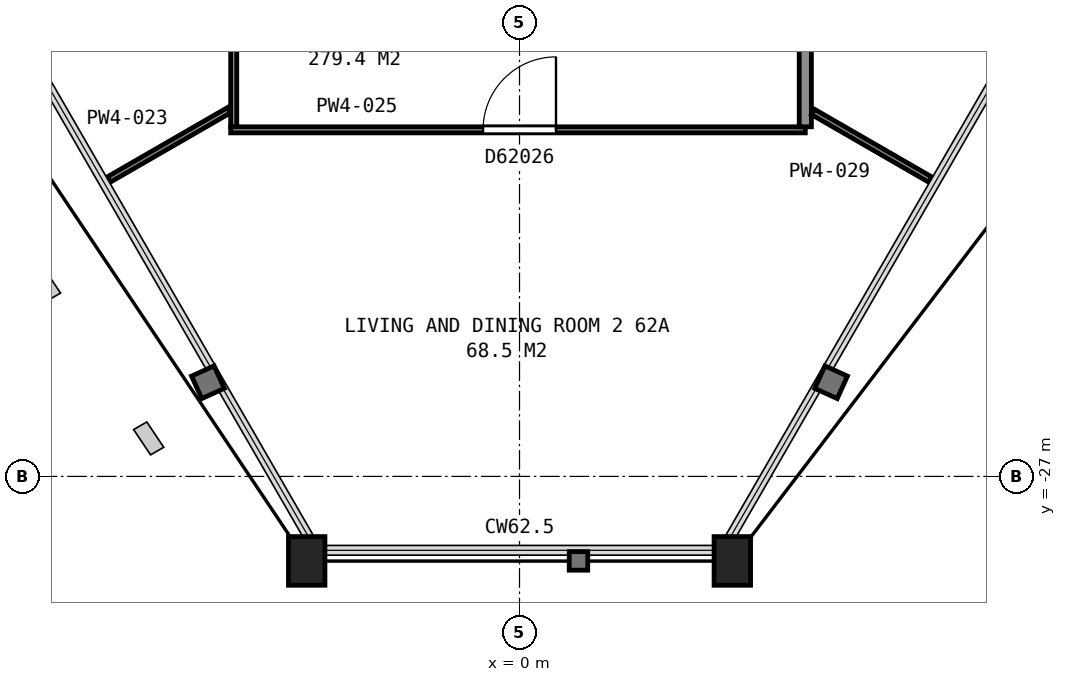
"""IFC4 building model, lengths in metres.
Left out: names, types, materials, properties, quantities, classifications, styles, units other than length and angle.
Written with IfcOpenShell. Run it as: python <this file> out.ifc"""

import sys

from ifc_helpers import new_model, si_unit, direction, frame, frame_2d, origin, origin_2d, place, context, subcontext, project, spatial, rectangle, hollow_rectangle, extrude, element, fill, save


model = new_model("IFC4")
c1 = context("Model", 3, precision=1e-05, world=origin(), true_north=direction((0.0, 1.0)))
c2 = subcontext(c1, "Body", "Model", "MODEL_VIEW")
j1 = project(units=[si_unit("LENGTHUNIT", "METRE"), si_unit("PLANEANGLEUNIT", "RADIAN")], contexts=[c1])
p1 = place(None, origin())
s1 = spatial("IfcSite", under=j1, at=p1, CompositionType="ELEMENT")
p2 = place(p1, origin())
s2 = spatial("IfcBuilding", under=s1, at=p2, CompositionType="ELEMENT")
p3 = place(p2, frame((0.0, 0.0, 247.1)))
s3 = spatial("IfcBuildingStorey", under=s2, at=p3, CompositionType="ELEMENT", Elevation=247.1)
for number, where, z_axis, x_axis in (
    (1, (-3.5, -28.39, 0.065), (0.0, 0.0, 1.0), (-1.0, 0.0, 0.0)),
    (2, (3.5, -28.39, 0.065), (0.0, 0.0, 1.0), (-1.0, 0.0, 0.0)),
):
    element("IfcColumn", number, at=place(p3, frame(where, z_axis=z_axis, x_axis=x_axis)), inside=s3, PredefinedType="COLUMN", context=c2, shape_type="SweptSolid", body=[
        extrude(hollow_rectangle(XDim=0.6, YDim=0.8, WallThickness=0.05, at=origin_2d()), origin(), (0.0, 0.0, 1.0), 3.635),
    ])
p4 = place(p3, frame((-6.752, -22.116, 0.0), z_axis=(0.0, 0.0, 1.0), x_axis=(0.866135723987, 0.499808871103, 0.0)))
e3 = element("IfcWall", 3, at=p4, inside=s3, PredefinedType="PARTITIONING", context=c2, shape_type="SweptSolid", body=[
    extrude(rectangle(XDim=2.283, YDim=0.1, at=frame_2d((1.141, 0.0))), origin(), (0.0, 0.0, 1.0), 2.713),
])
p5 = place(p3, frame((-4.7, -21.25, 0.0), z_axis=(0.0, 0.0, 1.0), x_axis=(0.0, 1.0, 0.0)))
e4 = element("IfcWall", 4, at=p5, inside=s3, PredefinedType="PARTITIONING", context=c2, shape_type="SweptSolid", body=[
    extrude(rectangle(XDim=8.502, YDim=0.1, at=frame_2d((4.251, 0.0))), origin(), (0.0, 0.0, 1.0), 2.713),
])
p6 = place(p5, frame((6.921, 0.0, 0.0)))
e5 = element("IfcOpeningElement", 5, at=p6, cuts=e4, PredefinedType="OPENING", context=c2, shape_type="SweptSolid", body=[
    extrude(rectangle(XDim=0.9, YDim=2.1, at=frame_2d((0.45, 1.05))), frame((0.0, 0.06, 0.0), z_axis=(0.0, -1.0, 0.0), x_axis=(1.0, 0.0, 0.0)), (0.0, 0.0, 1.0), 0.12),
])
p7 = place(p5, frame((2.818, 0.0, 0.0)))
e6 = element("IfcOpeningElement", 6, at=p7, cuts=e4, PredefinedType="OPENING", context=c2, shape_type="SweptSolid", body=[
    extrude(rectangle(XDim=0.9, YDim=2.1, at=frame_2d((0.45, 1.05))), frame((0.0, 0.06, 0.0), z_axis=(0.0, -1.0, 0.0), x_axis=(1.0, 0.0, 0.0)), (0.0, 0.0, 1.0), 0.12),
])
p8 = place(p3, frame((4.7, -21.3, 0.0), z_axis=(0.0, 0.0, 1.0), x_axis=(-1.0, 0.0, 0.0)))
e7 = element("IfcWall", 7, at=p8, inside=s3, PredefinedType="PARTITIONING", context=c2, shape_type="SweptSolid", body=[
    extrude(rectangle(XDim=9.45, YDim=0.1, at=frame_2d((4.725, 0.0))), origin(), (0.0, 0.0, 1.0), 2.713),
])
p9 = place(p8, frame((4.1, 0.0, 0.0)))
e8 = element("IfcOpeningElement", 8, at=p9, cuts=e7, PredefinedType="OPENING", context=c2, shape_type="SweptSolid", body=[
    extrude(rectangle(XDim=1.2, YDim=2.1, at=frame_2d((0.6, 1.05))), frame((0.0, 0.06, 0.0), z_axis=(0.0, -1.0, 0.0), x_axis=(1.0, 0.0, 0.0)), (0.0, 0.0, 1.0), 0.12),
])
p10 = place(p3, frame((4.7, -12.798, 0.0), z_axis=(0.0, 0.0, 1.0), x_axis=(0.0, -1.0, 0.0)))
e9 = element("IfcWall", 9, at=p10, inside=s3, PredefinedType="PARTITIONING", context=c2, shape_type="SweptSolid", body=[
    extrude(rectangle(XDim=8.452, YDim=0.2, at=frame_2d((4.226, 0.0))), origin(), (0.0, 0.0, 1.0), 2.713),
])
p11 = place(p10, frame((5.084, 0.0, 0.0)))
e10 = element("IfcOpeningElement", 10, at=p11, cuts=e9, PredefinedType="OPENING", context=c2, shape_type="SweptSolid", body=[
    extrude(rectangle(XDim=0.9, YDim=2.1, at=frame_2d((0.45, 1.05))), frame((0.0, 0.11, 0.0), z_axis=(0.0, -1.0, 0.0), x_axis=(1.0, 0.0, 0.0)), (0.0, 0.0, 1.0), 0.22),
])
p12 = place(p3, frame((4.825, -21.004, 0.0), z_axis=(0.0, 0.0, 1.0), x_axis=(0.866121639155, -0.499833278392, 0.0)))
e11 = element("IfcWall", 11, at=p12, inside=s3, PredefinedType="PARTITIONING", context=c2, shape_type="SweptSolid", body=[
    extrude(rectangle(XDim=2.225, YDim=0.1, at=frame_2d((1.112, 0.0))), origin(), (0.0, 0.0, 1.0), 2.713),
])
p13 = place(p9, origin())
e12 = element("IfcDoor", 12, at=p13, inside=s3, OperationType="SINGLE_SWING_LEFT", PredefinedType="DOOR", context=c2, shape_type="SweptSolid", body=[
    extrude(rectangle(XDim=1.2, YDim=2.1, at=frame_2d((0.6, 1.05))), frame((0.0, 0.025, 0.0), z_axis=(0.0, -1.0, 0.0), x_axis=(1.0, 0.0, 0.0)), (0.0, 0.0, 1.0), 0.05),
])
fill(e8, e12)
save(model, sys.argv[1])
